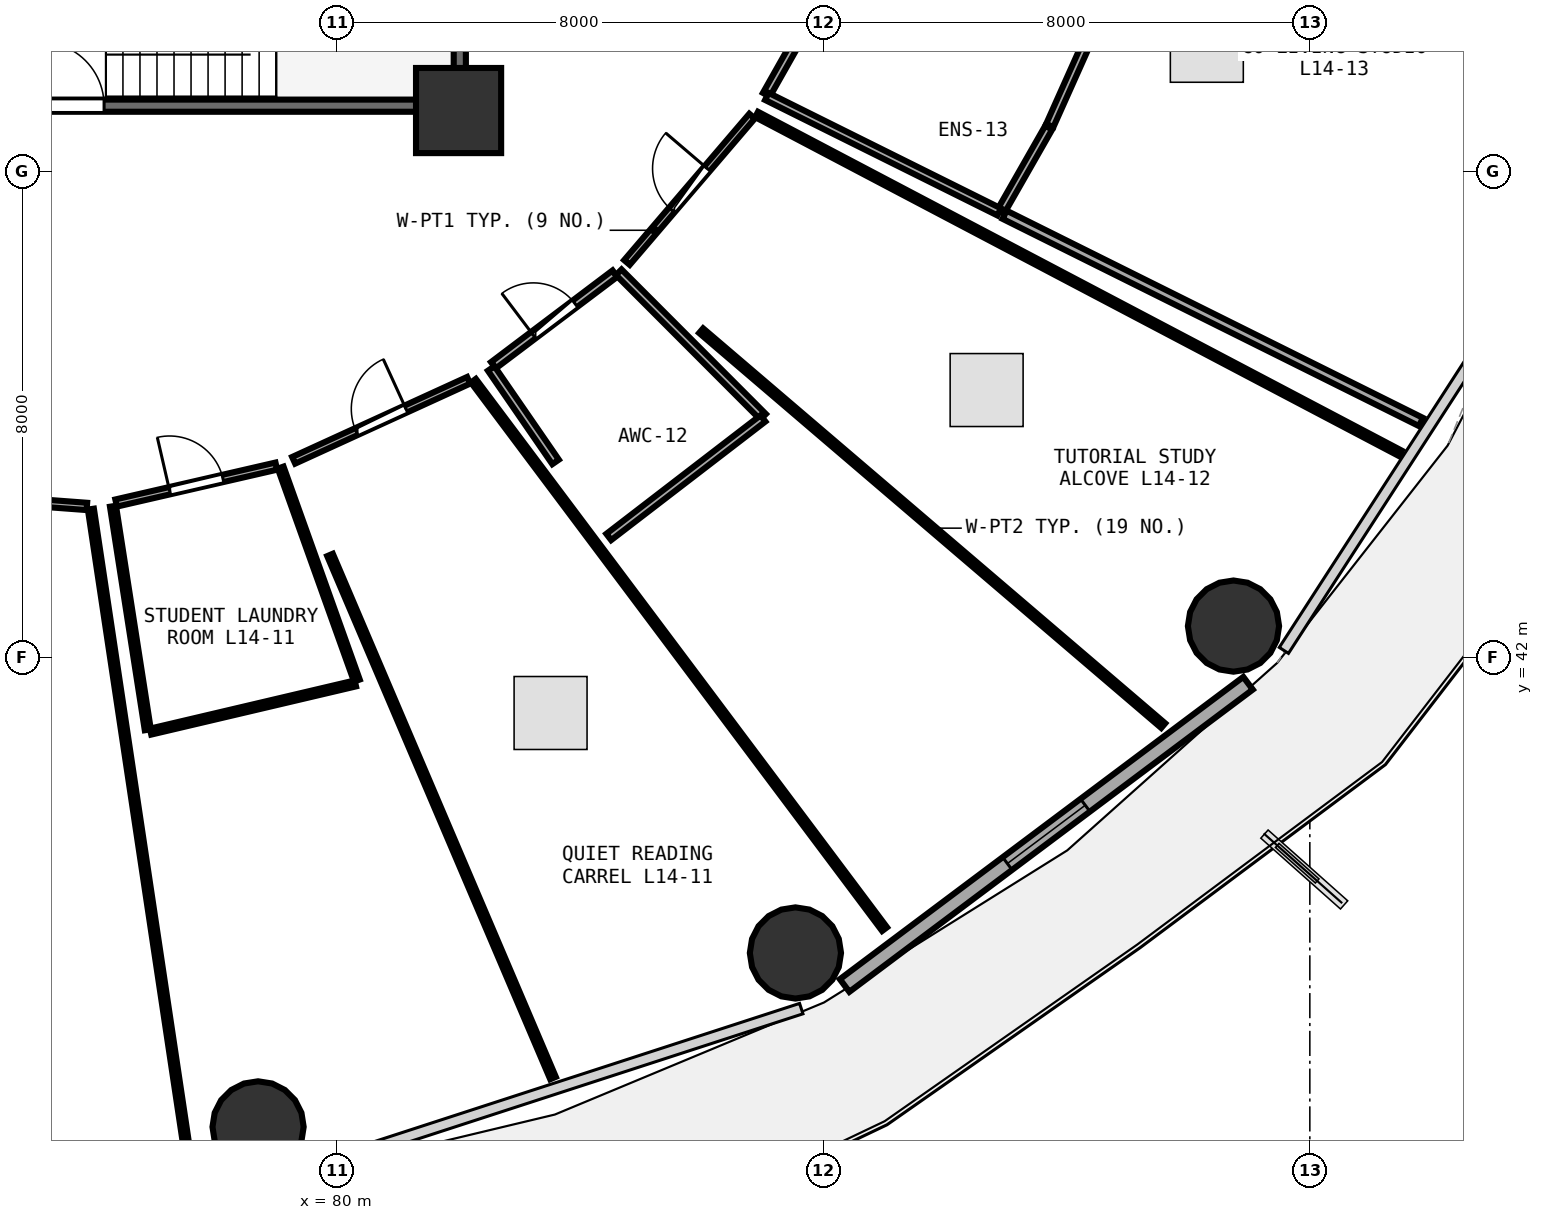
"""IFC4 building model, lengths in metres.
Left out: names, types, materials, properties, quantities, classifications, styles, units other than length and angle.
Written with IfcOpenShell. Run it as: python <this file> out.ifc"""

import sys

from ifc_helpers import new_model, si_unit, direction, frame, frame_2d, origin, origin_2d, place, context, subcontext, project, spatial, rectangle, circle, extrude, element, fill, save


model = new_model("IFC4")
c1 = context("Model", 3, precision=1e-05, world=origin(), true_north=direction((0.0, 1.0)))
c2 = subcontext(c1, "Body", "Model", "MODEL_VIEW")
j1 = project(units=[si_unit("LENGTHUNIT", "METRE"), si_unit("PLANEANGLEUNIT", "RADIAN")], contexts=[c1])
p1 = place(None, origin())
s1 = spatial("IfcSite", under=j1, at=p1, CompositionType="ELEMENT")
p2 = place(p1, origin())
s2 = spatial("IfcBuilding", under=s1, at=p2, CompositionType="ELEMENT")
p3 = place(p2, frame((0.0, 0.0, 56.25)))
s3 = spatial("IfcBuildingStorey", under=s2, at=p3, CompositionType="ELEMENT", Elevation=56.25)
p4 = place(p3, frame((82.0, 51.0, 0.0), z_axis=(0.0, 0.0, 1.0), x_axis=(1.0, 0.0, 0.0)))
e1 = element("IfcColumn", 1, at=p4, inside=s3, PredefinedType="PILASTER", context=c2, shape_type="SweptSolid", body=[
    extrude(rectangle(XDim=1.4, YDim=1.4, at=origin_2d()), origin(), (0.0, 0.0, 1.0), 3.75),
])
for number, where, z_axis, x_axis in (
    (2, (78.702, 34.286, 0.0), (0.0, 0.0, 1.0), (1.0, 0.0, 0.0)),
    (3, (87.54, 37.146, 0.0), (0.0, 0.0, 1.0), (1.0, 0.0, 0.0)),
    (4, (94.744, 42.522, 0.0), (0.0, 0.0, 1.0), (1.0, 0.0, 0.0)),
):
    element("IfcColumn", number, at=place(p3, frame(where, z_axis=z_axis, x_axis=x_axis)), inside=s3, PredefinedType="COLUMN", context=c2, shape_type="SweptSolid", body=[
        extrude(circle(Radius=0.75, at=origin_2d()), origin(), (0.0, 0.0, 1.0), 3.75),
    ])
p5 = place(p3, frame((88.349, 36.611, 0.0), z_axis=(0.0, 0.0, 1.0), x_axis=(0.80030733173, 0.599590005569, 0.0)))
e5 = element("IfcWall", 5, at=p5, inside=s3, PredefinedType="SOLIDWALL", context=c2, shape_type="SweptSolid", body=[
    extrude(rectangle(XDim=8.291, YDim=0.26, at=frame_2d((4.145, 0.0))), origin(), (0.0, 0.0, 1.0), 3.475),
])
p6 = place(p5, frame((3.345, 0.0, 0.85)))
e6 = element("IfcOpeningElement", 6, at=p6, cuts=e5, PredefinedType="OPENING", context=c2, shape_type="SweptSolid", body=[
    extrude(rectangle(XDim=1.6, YDim=1.45, at=frame_2d((0.8, 0.725))), frame((0.0, 0.14, 0.0), z_axis=(0.0, -1.0, 0.0), x_axis=(1.0, 0.0, 0.0)), (0.0, 0.0, 1.0), 0.28),
])
p7 = place(p3, frame((74.0, 51.08, 0.0), z_axis=(0.0, 0.0, 1.0), x_axis=(1.0, 0.0, 0.0)))
e7 = element("IfcWall", 7, at=p7, inside=s3, PredefinedType="SHEAR", context=c2, shape_type="SweptSolid", body=[
    extrude(rectangle(XDim=7.9, YDim=0.2, at=frame_2d((3.95, 0.0))), origin(), (0.0, 0.0, 1.0), 3.49),
])
p8 = place(p7, frame((1.12, 0.0, 0.0)))
e8 = element("IfcOpeningElement", 8, at=p8, cuts=e7, PredefinedType="OPENING", context=c2, shape_type="SweptSolid", body=[
    extrude(rectangle(XDim=1.05, YDim=2.1, at=frame_2d((0.525, 1.05))), frame((0.0, 0.11, 0.0), z_axis=(0.0, -1.0, 0.0), x_axis=(1.0, 0.0, 0.0)), (0.0, 0.0, 1.0), 0.22),
])
p9 = place(p3, frame((82.02, 51.2, 0.0), z_axis=(0.0, 0.0, 1.0), x_axis=(0.0, 1.0, 0.0)))
e9 = element("IfcWall", 9, at=p9, inside=s3, PredefinedType="SHEAR", context=c2, shape_type="SweptSolid", body=[
    extrude(rectangle(XDim=3.07, YDim=0.2, at=frame_2d((1.535, 0.0))), origin(), (0.0, 0.0, 1.0), 3.49),
])
p10 = place(p3, frame((69.698, 44.952, 0.0), z_axis=(0.0, 0.0, 1.0), x_axis=(0.997215128993, -0.074578726908, 0.0)))
e10 = element("IfcWall", 10, at=p10, inside=s3, PredefinedType="PARTITIONING", context=c2, shape_type="SweptSolid", body=[
    extrude(rectangle(XDim=6.207, YDim=0.12, at=frame_2d((3.104, 0.0))), origin(), (0.0, 0.0, 1.0), 3.235),
])
p11 = place(p10, frame((2.653, 0.0, 0.0)))
e11 = element("IfcOpeningElement", 11, at=p11, cuts=e10, PredefinedType="OPENING", context=c2, shape_type="SweptSolid", body=[
    extrude(rectangle(XDim=0.9, YDim=2.08, at=frame_2d((0.45, 1.04))), frame((0.0, 0.07, 0.0), z_axis=(0.0, -1.0, 0.0), x_axis=(1.0, 0.0, 0.0)), (0.0, 0.0, 1.0), 0.14),
])
p12 = place(p3, frame((76.368, 44.545, 0.0), z_axis=(0.0, 0.0, 1.0), x_axis=(0.974445966729, 0.224622033484, 0.0)))
e12 = element("IfcWall", 12, at=p12, inside=s3, PredefinedType="PARTITIONING", context=c2, shape_type="SweptSolid", body=[
    extrude(rectangle(XDim=2.703, YDim=0.12, at=frame_2d((1.352, 0.0))), origin(), (0.0, 0.0, 1.0), 3.235),
])
p13 = place(p12, frame((0.902, 0.0, 0.0)))
e13 = element("IfcOpeningElement", 13, at=p13, cuts=e12, PredefinedType="OPENING", context=c2, shape_type="SweptSolid", body=[
    extrude(rectangle(XDim=0.9, YDim=2.08, at=frame_2d((0.45, 1.04))), frame((0.0, 0.07, 0.0), z_axis=(0.0, -1.0, 0.0), x_axis=(1.0, 0.0, 0.0)), (0.0, 0.0, 1.0), 0.14),
])
p14 = place(p3, frame((79.288, 45.248, 0.0), z_axis=(0.0, 0.0, 1.0), x_axis=(0.909426123825, 0.415865513483, 0.0)))
e14 = element("IfcWall", 14, at=p14, inside=s3, PredefinedType="PARTITIONING", context=c2, shape_type="SweptSolid", body=[
    extrude(rectangle(XDim=3.164, YDim=0.12, at=frame_2d((1.582, 0.0))), origin(), (0.0, 0.0, 1.0), 2.875),
])
p15 = place(p14, frame((1.132, 0.0, 0.0)))
e15 = element("IfcOpeningElement", 15, at=p15, cuts=e14, PredefinedType="OPENING", context=c2, shape_type="SweptSolid", body=[
    extrude(rectangle(XDim=0.9, YDim=2.08, at=frame_2d((0.45, 1.04))), frame((0.0, 0.07, 0.0), z_axis=(0.0, -1.0, 0.0), x_axis=(1.0, 0.0, 0.0)), (0.0, 0.0, 1.0), 0.14),
])
p16 = place(p3, frame((82.573, 46.811, 0.0), z_axis=(0.0, 0.0, 1.0), x_axis=(0.7983589592, 0.602181843188, 0.0)))
e16 = element("IfcWall", 16, at=p16, inside=s3, PredefinedType="PLUMBINGWALL", context=c2, shape_type="SweptSolid", body=[
    extrude(rectangle(XDim=2.504, YDim=0.13, at=frame_2d((1.252, 0.0))), origin(), (0.0, 0.0, 1.0), 2.875),
])
p17 = place(p16, frame((0.822, 0.0, 0.0)))
e17 = element("IfcOpeningElement", 17, at=p17, cuts=e16, PredefinedType="OPENING", context=c2, shape_type="SweptSolid", body=[
    extrude(rectangle(XDim=0.86, YDim=2.05, at=frame_2d((0.43, 1.025))), frame((0.0, 0.075, 0.0), z_axis=(0.0, -1.0, 0.0), x_axis=(1.0, 0.0, 0.0)), (0.0, 0.0, 1.0), 0.15),
])
p18 = place(p3, frame((84.769, 48.502, 0.0), z_axis=(0.0, 0.0, 1.0), x_axis=(0.649870238328, 0.760045178483, 0.0)))
e18 = element("IfcWall", 18, at=p18, inside=s3, PredefinedType="PARTITIONING", context=c2, shape_type="SweptSolid", body=[
    extrude(rectangle(XDim=3.167, YDim=0.12, at=frame_2d((1.583, 0.0))), origin(), (0.0, 0.0, 1.0), 2.875),
])
p19 = place(p18, frame((1.133, 0.0, 0.0)))
e19 = element("IfcOpeningElement", 19, at=p19, cuts=e18, PredefinedType="OPENING", context=c2, shape_type="SweptSolid", body=[
    extrude(rectangle(XDim=0.9, YDim=2.08, at=frame_2d((0.45, 1.04))), frame((0.0, 0.07, 0.0), z_axis=(0.0, -1.0, 0.0), x_axis=(1.0, 0.0, 0.0)), (0.0, 0.0, 1.0), 0.14),
])
p20 = place(p3, frame((75.953, 44.445, 0.0), z_axis=(0.0, 0.0, 1.0), x_axis=(0.148282966471, -0.988944974129, 0.0)))
e20 = element("IfcWall", 20, at=p20, inside=s3, PredefinedType="PARTITIONING", context=c2, shape_type="SweptSolid", body=[
    extrude(rectangle(XDim=10.799, YDim=0.1, at=frame_2d((5.399, 0.0))), origin(), (0.0, 0.0, 1.0), 2.875),
])
p21 = place(p3, frame((79.074, 45.128, 0.0), z_axis=(0.0, 0.0, 1.0), x_axis=(0.336806149261, -0.941574010803, 0.0)))
e21 = element("IfcWall", 21, at=p21, inside=s3, PredefinedType="PARTITIONING", context=c2, shape_type="SweptSolid", body=[
    extrude(rectangle(XDim=3.72, YDim=0.1, at=frame_2d((1.86, 0.0))), origin(), (0.0, 0.0, 1.0), 2.875),
])
p22 = place(p3, frame((80.302, 41.579, 0.0), z_axis=(0.0, 0.0, 1.0), x_axis=(-0.973403286496, -0.229098323518, 0.0)))
e22 = element("IfcWall", 22, at=p22, inside=s3, PredefinedType="PARTITIONING", context=c2, shape_type="SweptSolid", body=[
    extrude(rectangle(XDim=3.46, YDim=0.1, at=frame_2d((1.73, 0.0))), origin(), (0.0, 0.0, 1.0), 2.875),
])
p23 = place(p3, frame((76.889, 40.816, 0.0), z_axis=(0.0, 0.0, 1.0), x_axis=(-0.153950475789, 0.988078565198, 0.0)))
e23 = element("IfcWall", 23, at=p23, inside=s3, PredefinedType="PARTITIONING", context=c2, shape_type="SweptSolid", body=[
    extrude(rectangle(XDim=3.72, YDim=0.1, at=frame_2d((1.86, 0.0))), origin(), (0.0, 0.0, 1.0), 3.175),
])
p24 = place(p3, frame((82.244, 46.557, 0.0), z_axis=(0.0, 0.0, 1.0), x_axis=(0.599892569248, -0.800080561794, 0.0)))
e24 = element("IfcWall", 24, at=p24, inside=s3, PredefinedType="PARTITIONING", context=c2, shape_type="SweptSolid", body=[
    extrude(rectangle(XDim=11.272, YDim=0.1, at=frame_2d((5.636, 0.0))), origin(), (0.0, 0.0, 1.0), 2.875),
])
p25 = place(p3, frame((83.553, 35.089, 0.0), z_axis=(0.0, 0.0, 1.0), x_axis=(-0.392154212845, 0.919899490895, 0.0)))
e25 = element("IfcWall", 25, at=p25, inside=s3, PredefinedType="PARTITIONING", context=c2, shape_type="SweptSolid", body=[
    extrude(rectangle(XDim=9.352, YDim=0.1, at=frame_2d((4.676, 0.0))), origin(), (0.0, 0.0, 1.0), 2.875),
])
p26 = place(p3, frame((84.634, 48.341, 0.0), z_axis=(0.0, 0.0, 1.0), x_axis=(0.706525219412, -0.707687865047, 0.0)))
e26 = element("IfcWall", 26, at=p26, inside=s3, PredefinedType="PLUMBINGWALL", context=c2, shape_type="SweptSolid", body=[
    extrude(rectangle(XDim=3.36, YDim=0.13, at=frame_2d((1.68, 0.0))), origin(), (0.0, 0.0, 1.0), 3.235),
])
p27 = place(p3, frame((87.006, 45.937, 0.0), z_axis=(0.0, 0.0, 1.0), x_axis=(-0.792836735531, -0.609434090606, 0.0)))
e27 = element("IfcWall", 27, at=p27, inside=s3, PredefinedType="PLUMBINGWALL", context=c2, shape_type="SweptSolid", body=[
    extrude(rectangle(XDim=3.199, YDim=0.13, at=frame_2d((1.599, 0.0))), origin(), (0.0, 0.0, 1.0), 2.875),
])
p28 = place(p3, frame((83.595, 45.221, 0.0), z_axis=(0.0, 0.0, 1.0), x_axis=(-0.567283552716, 0.823522538136, 0.0)))
e28 = element("IfcWall", 28, at=p28, inside=s3, PredefinedType="PLUMBINGWALL", context=c2, shape_type="SweptSolid", body=[
    extrude(rectangle(XDim=1.866, YDim=0.13, at=frame_2d((0.933, 0.0))), origin(), (0.0, 0.0, 1.0), 3.235),
])
p29 = place(p3, frame((86.901, 50.935, 0.0), z_axis=(0.0, 0.0, 1.0), x_axis=(0.884914680824, -0.46575316173, 0.0)))
e29 = element("IfcWall", 29, at=p29, inside=s3, PredefinedType="PARTITIONING", context=c2, shape_type="SweptSolid", body=[
    extrude(rectangle(XDim=11.963, YDim=0.1, at=frame_2d((5.981, 0.0))), origin(), (0.0, 0.0, 1.0), 2.875),
])
p30 = place(p3, frame((93.589, 40.885, 0.0), z_axis=(0.0, 0.0, 1.0), x_axis=(-0.760200523841, 0.649688512713, 0.0)))
e30 = element("IfcWall", 30, at=p30, inside=s3, PredefinedType="PARTITIONING", context=c2, shape_type="SweptSolid", body=[
    extrude(rectangle(XDim=9.997, YDim=0.1, at=frame_2d((4.998, 0.0))), origin(), (0.0, 0.0, 1.0), 2.875),
])
p31 = place(p3, frame((87.062, 51.258, 0.0), z_axis=(0.0, 0.0, 1.0), x_axis=(0.492353040676, 0.870395590141, 0.0)))
e31 = element("IfcWall", 31, at=p31, inside=s3, PredefinedType="PLUMBINGWALL", context=c2, shape_type="SweptSolid", body=[
    extrude(rectangle(XDim=1.224, YDim=0.13, at=frame_2d((0.612, 0.0))), origin(), (0.0, 0.0, 1.0), 3.48),
])
p32 = place(p3, frame((92.366, 52.191, 0.0), z_axis=(0.0, 0.0, 1.0), x_axis=(-0.408383071263, -0.912810641429, 0.0)))
e32 = element("IfcWall", 32, at=p32, inside=s3, PredefinedType="PLUMBINGWALL", context=c2, shape_type="SweptSolid", body=[
    extrude(rectangle(XDim=1.573, YDim=0.13, at=frame_2d((0.787, 0.0))), origin(), (0.0, 0.0, 1.0), 3.48),
])
p33 = place(p3, frame((91.705, 50.719, 0.0), z_axis=(0.0, 0.0, 1.0), x_axis=(-0.495740967081, -0.868470433324, 0.0)))
e33 = element("IfcWall", 33, at=p33, inside=s3, PredefinedType="PLUMBINGWALL", context=c2, shape_type="SweptSolid", body=[
    extrude(rectangle(XDim=1.586, YDim=0.13, at=frame_2d((0.793, 0.0))), origin(), (0.0, 0.0, 1.0), 2.875),
])
p34 = place(p3, frame((90.891, 49.333, 0.0), z_axis=(0.0, 0.0, 1.0), x_axis=(-0.895500211225, 0.4450610876, 0.0)))
e34 = element("IfcWall", 34, at=p34, inside=s3, PredefinedType="PLUMBINGWALL", context=c2, shape_type="SweptSolid", body=[
    extrude(rectangle(XDim=4.267, YDim=0.13, at=frame_2d((2.134, 0.0))), origin(), (0.0, 0.0, 1.0), 2.875),
])
p35 = place(p3, frame((97.827, 45.879, 0.0), z_axis=(0.0, 0.0, 1.0), x_axis=(-0.89528739616, 0.445489032724, 0.0)))
e35 = element("IfcWall", 35, at=p35, inside=s3, PredefinedType="PARTITIONING", context=c2, shape_type="SweptSolid", body=[
    extrude(rectangle(XDim=7.648, YDim=0.15, at=frame_2d((3.824, 0.0))), origin(), (0.0, 0.0, 1.0), 2.875),
])
p36 = place(p6, origin())
e36 = element("IfcWindow", 36, at=p36, inside=s3, PartitioningType="SINGLE_PANEL", PredefinedType="WINDOW", context=c2, shape_type="SweptSolid", body=[
    extrude(rectangle(XDim=1.6, YDim=1.45, at=frame_2d((0.8, 0.725))), frame((0.0, 0.03, 0.0), z_axis=(0.0, -1.0, 0.0), x_axis=(1.0, 0.0, 0.0)), (0.0, 0.0, 1.0), 0.06),
])
fill(e6, e36)
p37 = place(p8, origin())
e37 = element("IfcDoor", 37, at=p37, inside=s3, OperationType="SINGLE_SWING_LEFT", PredefinedType="DOOR", context=c2, shape_type="SweptSolid", body=[
    extrude(rectangle(XDim=1.05, YDim=2.1, at=frame_2d((0.525, 1.05))), frame((0.0, 0.025, 0.0), z_axis=(0.0, -1.0, 0.0), x_axis=(1.0, 0.0, 0.0)), (0.0, 0.0, 1.0), 0.05),
])
fill(e8, e37)
p38 = place(p13, origin())
e38 = element("IfcDoor", 38, at=p38, inside=s3, OperationType="SINGLE_SWING_LEFT", PredefinedType="DOOR", context=c2, shape_type="SweptSolid", body=[
    extrude(rectangle(XDim=0.9, YDim=2.08, at=frame_2d((0.45, 1.04))), frame((0.0, 0.025, 0.0), z_axis=(0.0, -1.0, 0.0), x_axis=(1.0, 0.0, 0.0)), (0.0, 0.0, 1.0), 0.05),
])
fill(e13, e38)
p39 = place(p15, origin())
e39 = element("IfcDoor", 39, at=p39, inside=s3, OperationType="SINGLE_SWING_RIGHT", PredefinedType="DOOR", context=c2, shape_type="SweptSolid", body=[
    extrude(rectangle(XDim=0.9, YDim=2.08, at=frame_2d((0.45, 1.04))), frame((0.0, 0.025, 0.0), z_axis=(0.0, -1.0, 0.0), x_axis=(1.0, 0.0, 0.0)), (0.0, 0.0, 1.0), 0.05),
])
fill(e15, e39)
p40 = place(p17, origin())
e40 = element("IfcDoor", 40, at=p40, inside=s3, OperationType="SINGLE_SWING_LEFT", PredefinedType="DOOR", context=c2, shape_type="SweptSolid", body=[
    extrude(rectangle(XDim=0.86, YDim=2.05, at=frame_2d((0.43, 1.025))), frame((0.0, 0.025, 0.0), z_axis=(0.0, -1.0, 0.0), x_axis=(1.0, 0.0, 0.0)), (0.0, 0.0, 1.0), 0.05),
])
fill(e17, e40)
p41 = place(p19, origin())
e41 = element("IfcDoor", 41, at=p41, inside=s3, OperationType="SINGLE_SWING_RIGHT", PredefinedType="DOOR", context=c2, shape_type="SweptSolid", body=[
    extrude(rectangle(XDim=0.9, YDim=2.08, at=frame_2d((0.45, 1.04))), frame((0.0, 0.025, 0.0), z_axis=(0.0, -1.0, 0.0), x_axis=(1.0, 0.0, 0.0)), (0.0, 0.0, 1.0), 0.05),
])
fill(e19, e41)
save(model, sys.argv[1])
